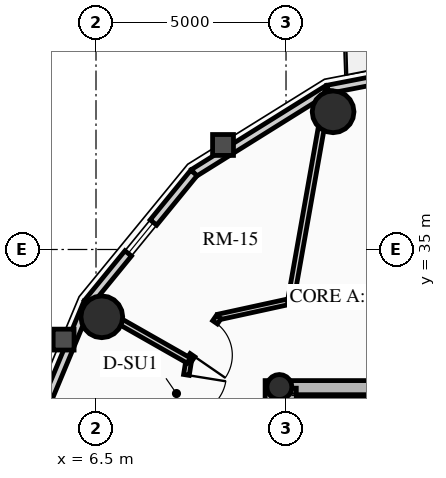
"""IFC4 building model, lengths in metres.
Left out: names, types, materials, properties, quantities, classifications, styles, units other than length and angle.
Written with IfcOpenShell. Run it as: python <this file> out.ifc"""

import sys

from ifc_helpers import new_model, si_unit, direction, frame, frame_2d, origin, origin_2d, place, context, subcontext, project, spatial, rectangle, circle, hollow_circle, extrude, source, transform, mapped, element, fill, save


model = new_model("IFC4")
c1 = context("Model", 3, precision=1e-05, world=origin(), true_north=direction((0.0, 1.0)))
c2 = subcontext(c1, "Body", "Model", "MODEL_VIEW")
j1 = project(units=[si_unit("LENGTHUNIT", "METRE"), si_unit("PLANEANGLEUNIT", "RADIAN")], contexts=[c1])
p1 = place(None, origin())
s1 = spatial("IfcSite", under=j1, at=p1, CompositionType="ELEMENT")
p2 = place(p1, origin())
s2 = spatial("IfcBuilding", under=s1, at=p2, CompositionType="ELEMENT")
p3 = place(p2, frame((0.0, 0.0, 205.39)))
s3 = spatial("IfcBuildingStorey", under=s2, at=p3, CompositionType="ELEMENT", Elevation=205.39)
p4 = place(p3, frame((11.15, 17.45, 0.0), z_axis=(0.0, 0.0, 1.0), x_axis=(0.0, 1.0, 0.0)))
e1 = element("IfcWall", 1, at=p4, inside=s3, PredefinedType="SHEAR", context=c2, shape_type="SweptSolid", body=[
    extrude(rectangle(XDim=14.1, YDim=0.4, at=frame_2d((7.05, 0.0))), origin(), (0.0, 0.0, 1.0), 2.91),
])
p5 = place(p3, frame((11.15, 31.35, 0.0), z_axis=(0.0, 0.0, 1.0), x_axis=(1.0, 0.0, 0.0)))
e2 = element("IfcWall", 2, at=p5, inside=s3, PredefinedType="SHEAR", context=c2, shape_type="SweptSolid", body=[
    extrude(rectangle(XDim=10.7, YDim=0.4, at=frame_2d((5.35, 0.0))), origin(), (0.0, 0.0, 1.0), 2.91),
])
m1 = source(origin(), c2, "Body", "SweptSolid", [
    extrude(rectangle(XDim=1.5, YDim=2.02, at=frame_2d((0.75, 1.01))), frame((0.0, 0.21, 0.0), z_axis=(0.0, -1.0, 0.0), x_axis=(1.0, 0.0, 0.0)), (0.0, 0.0, 1.0), 0.42),
])
p6 = place(p5, frame((4.6, 0.0, 0.0)))
e3 = element("IfcOpeningElement", 3, at=p6, cuts=e2, PredefinedType="OPENING", context=c2, shape_type="MappedRepresentation", body=[
    mapped(m1, transform((0.0, 0.0, 0.0), x_axis=(1.0, 0.0, 0.0), y_axis=(0.0, 1.0, 0.0), z_axis=(0.0, 0.0, 1.0), scale=1.0)),
])
p7 = place(p3, frame((11.595, 24.655, 0.0), z_axis=(0.0, 0.0, 1.0), x_axis=(0.0, 1.0, 0.0)))
e4 = element("IfcWall", 4, at=p7, inside=s3, PredefinedType="SHEAR", context=c2, shape_type="SweptSolid", body=[
    extrude(rectangle(XDim=6.695, YDim=0.35, at=frame_2d((3.348, 0.0))), origin(), (0.0, 0.0, 1.0), 2.91),
])
p8 = place(p3, frame((11.325, 31.38, 0.0), z_axis=(0.0, 0.0, 1.0), x_axis=(1.0, 0.0, 0.0)))
e5 = element("IfcColumn", 5, at=p8, inside=s3, PredefinedType="COLUMN", context=c2, shape_type="SweptSolid", body=[
    extrude(hollow_circle(Radius=0.33, WallThickness=0.025, at=origin_2d()), origin(), (0.0, 0.0, 1.0), 2.91),
])
for number, where, z_axis, x_axis in (
    (6, (12.739, 38.623, 0.0), (0.0, 0.0, 1.0), (1.0, 0.0, 0.0)),
    (7, (6.653, 33.229, 0.0), (0.0, 0.0, 1.0), (1.0, 0.0, 0.0)),
):
    element("IfcColumn", number, at=place(p3, frame(where, z_axis=z_axis, x_axis=x_axis)), inside=s3, PredefinedType="USERDEFINED", context=c2, shape_type="SweptSolid", body=[
        extrude(circle(Radius=0.55, at=origin_2d()), origin(), (0.0, 0.0, 1.0), 2.91),
    ])
p9 = place(p3, frame((12.597, 39.213, 0.0), z_axis=(0.0, 0.0, 1.0), x_axis=(0.981700307484, 0.190432419211, 0.0)))
e8 = element("IfcWall", 8, at=p9, inside=s3, PredefinedType="SOLIDWALL", context=c2, shape_type="SweptSolid", body=[
    extrude(rectangle(XDim=3.976, YDim=0.22, at=frame_2d((1.988, 0.0))), origin(), (0.0, 0.0, 1.0), 2.322),
])
m2 = source(origin(), c2, "Body", "SweptSolid", [
    extrude(rectangle(XDim=1.15, YDim=2.005, at=frame_2d((0.575, 1.002))), frame((0.0, 0.12, 0.0), z_axis=(0.0, -1.0, 0.0), x_axis=(1.0, 0.0, 0.0)), (0.0, 0.0, 1.0), 0.24),
])
p10 = place(p9, frame((1.413, 0.0, 0.0)))
e9 = element("IfcOpeningElement", 9, at=p10, cuts=e8, PredefinedType="OPENING", context=c2, shape_type="MappedRepresentation", body=[
    mapped(m2, transform((0.0, 0.0, 0.0), x_axis=(1.0, 0.0, 0.0), y_axis=(0.0, 1.0, 0.0), z_axis=(0.0, 0.0, 1.0), scale=1.0)),
])
p11 = place(p3, frame((9.076, 37.015, 0.0), z_axis=(0.0, 0.0, 1.0), x_axis=(0.848318713376, 0.529485939886, 0.0)))
e10 = element("IfcWall", 10, at=p11, inside=s3, PredefinedType="SOLIDWALL", context=c2, shape_type="SweptSolid", body=[
    extrude(rectangle(XDim=4.15, YDim=0.22, at=frame_2d((2.075, 0.0))), origin(), (0.0, 0.0, 1.0), 2.322),
])
p12 = place(p3, frame((6.282, 33.593, 0.0), z_axis=(0.0, 0.0, 1.0), x_axis=(0.632467166636, 0.774587169483, 0.0)))
e11 = element("IfcWall", 11, at=p12, inside=s3, PredefinedType="SOLIDWALL", context=c2, shape_type="SweptSolid", body=[
    extrude(rectangle(XDim=4.418, YDim=0.22, at=frame_2d((2.209, 0.0))), origin(), (0.0, 0.0, 1.0), 2.322),
])
m3 = source(origin(), c2, "Body", "SweptSolid", [
    extrude(rectangle(XDim=1.05, YDim=1.3, at=frame_2d((0.525, 0.65))), frame((0.0, 0.12, 0.0), z_axis=(0.0, -1.0, 0.0), x_axis=(1.0, 0.0, 0.0)), (0.0, 0.0, 1.0), 0.24),
])
p13 = place(p12, frame((1.684, 0.0, 0.65)))
e12 = element("IfcOpeningElement", 12, at=p13, cuts=e11, PredefinedType="OPENING", context=c2, shape_type="MappedRepresentation", body=[
    mapped(m3, transform((0.0, 0.0, 0.0), x_axis=(1.0, 0.0, 0.0), y_axis=(0.0, 1.0, 0.0), z_axis=(0.0, 0.0, 1.0), scale=1.0)),
])
p14 = place(p3, frame((4.488, 29.281, 0.0), z_axis=(0.0, 0.0, 1.0), x_axis=(0.384036305194, 0.923317993052, 0.0)))
e13 = element("IfcWall", 13, at=p14, inside=s3, PredefinedType="SOLIDWALL", context=c2, shape_type="SweptSolid", body=[
    extrude(rectangle(XDim=4.671, YDim=0.22, at=frame_2d((2.335, 0.0))), origin(), (0.0, 0.0, 1.0), 2.322),
])
p15 = place(p3, frame((18.143, 33.86, 0.0), z_axis=(0.0, 0.0, 1.0), x_axis=(-0.999419208319, -0.034077060363, 0.0)))
e14 = element("IfcWall", 14, at=p15, inside=s3, PredefinedType="PARTITIONING", context=c2, shape_type="SweptSolid", body=[
    extrude(rectangle(XDim=6.527, YDim=0.15, at=frame_2d((3.263, 0.0))), origin(), (0.0, 0.0, 1.0), 2.255),
])
p16 = place(p3, frame((11.62, 33.637, 0.0), z_axis=(0.0, 0.0, 1.0), x_axis=(-0.97702579435, -0.213121085711, 0.0)))
e15 = element("IfcWall", 15, at=p16, inside=s3, PredefinedType="PARTITIONING", context=c2, shape_type="SweptSolid", body=[
    extrude(rectangle(XDim=1.935, YDim=0.15, at=frame_2d((0.967, 0.0))), origin(), (0.0, 0.0, 1.0), 2.255),
])
p17 = place(p3, frame((9.729, 33.225, 0.0), z_axis=(0.0, 0.0, 1.0), x_axis=(-0.567183649484, -0.82359134755, 0.0)))
e16 = element("IfcWall", 16, at=p17, inside=s3, PredefinedType="PARTITIONING", context=c2, shape_type="SweptSolid", body=[
    extrude(rectangle(XDim=1.392, YDim=0.15, at=frame_2d((0.696, 0.0))), origin(), (0.0, 0.0, 1.0), 2.322),
])
m4 = source(origin(), c2, "Body", "SweptSolid", [
    extrude(rectangle(XDim=1.05, YDim=2.015, at=frame_2d((0.525, 1.007))), frame((0.0, 0.085, 0.0), z_axis=(0.0, -1.0, 0.0), x_axis=(1.0, 0.0, 0.0)), (0.0, 0.0, 1.0), 0.17),
])
p18 = place(p17, frame((0.171, 0.0, 0.0)))
e17 = element("IfcOpeningElement", 17, at=p18, cuts=e16, PredefinedType="OPENING", context=c2, shape_type="MappedRepresentation", body=[
    mapped(m4, transform((0.0, 0.0, 0.0), x_axis=(1.0, 0.0, 0.0), y_axis=(0.0, 1.0, 0.0), z_axis=(0.0, 0.0, 1.0), scale=1.0)),
])
p19 = place(p3, frame((8.94, 32.078, 0.0), z_axis=(0.0, 0.0, 1.0), x_axis=(-0.159148467753, -0.98725466077, 0.0)))
e18 = element("IfcWall", 18, at=p19, inside=s3, PredefinedType="PARTITIONING", context=c2, shape_type="SweptSolid", body=[
    extrude(rectangle(XDim=1.554, YDim=0.15, at=frame_2d((0.777, 0.0))), origin(), (0.0, 0.0, 1.0), 2.255),
])
p20 = place(p19, frame((0.384, 0.0, 0.0)))
e19 = element("IfcOpeningElement", 19, at=p20, cuts=e18, PredefinedType="OPENING", context=c2, shape_type="MappedRepresentation", body=[
    mapped(m4, transform((0.0, 0.0, 0.0), x_axis=(1.0, 0.0, 0.0), y_axis=(0.0, 1.0, 0.0), z_axis=(0.0, 0.0, 1.0), scale=1.0)),
])
p21 = place(p3, frame((11.62, 33.637, 0.0), z_axis=(0.0, 0.0, 1.0), x_axis=(0.174269061361, 0.984698072636, 0.0)))
e20 = element("IfcWall", 20, at=p21, inside=s3, PredefinedType="PARTITIONING", context=c2, shape_type="SweptSolid", body=[
    extrude(rectangle(XDim=5.643, YDim=0.16, at=frame_2d((2.822, 0.0))), origin(), (0.0, 0.0, 1.0), 2.322),
])
p22 = place(p3, frame((8.94, 32.078, 0.0), z_axis=(0.0, 0.0, 1.0), x_axis=(-0.869170975588, 0.494511693689, 0.0)))
e21 = element("IfcWall", 21, at=p22, inside=s3, PredefinedType="PARTITIONING", context=c2, shape_type="SweptSolid", body=[
    extrude(rectangle(XDim=3.039, YDim=0.16, at=frame_2d((1.52, 0.0))), origin(), (0.0, 0.0, 1.0), 2.322),
])
m5 = source(origin(), c2, "Body", "SweptSolid", [
    extrude(rectangle(XDim=1.05, YDim=1.3, at=frame_2d((0.525, 0.65))), frame((0.0, 0.03, 0.0), z_axis=(0.0, -1.0, 0.0), x_axis=(1.0, 0.0, 0.0)), (0.0, 0.0, 1.0), 0.06),
])
p23 = place(p13, origin())
e22 = element("IfcWindow", 22, at=p23, inside=s3, PartitioningType="SINGLE_PANEL", PredefinedType="WINDOW", context=c2, shape_type="MappedRepresentation", body=[
    mapped(m5, transform((0.0, 0.0, 0.0), x_axis=(1.0, 0.0, 0.0), y_axis=(0.0, 1.0, 0.0), z_axis=(0.0, 0.0, 1.0), scale=1.0)),
])
fill(e12, e22)
m6 = source(origin(), c2, "Body", "SweptSolid", [
    extrude(rectangle(XDim=1.05, YDim=2.015, at=frame_2d((0.525, 1.007))), frame((0.0, 0.025, 0.0), z_axis=(0.0, -1.0, 0.0), x_axis=(1.0, 0.0, 0.0)), (0.0, 0.0, 1.0), 0.05),
])
p24 = place(p18, origin())
e23 = element("IfcDoor", 23, at=p24, inside=s3, OperationType="SINGLE_SWING_RIGHT", PredefinedType="DOOR", context=c2, shape_type="MappedRepresentation", body=[
    mapped(m6, transform((0.0, 0.0, 0.0), x_axis=(1.0, 0.0, 0.0), y_axis=(0.0, 1.0, 0.0), z_axis=(0.0, 0.0, 1.0), scale=1.0)),
])
fill(e17, e23)
p25 = place(p20, origin())
e24 = element("IfcDoor", 24, at=p25, inside=s3, OperationType="SINGLE_SWING_LEFT", PredefinedType="DOOR", context=c2, shape_type="MappedRepresentation", body=[
    mapped(m6, transform((0.0, 0.0, 0.0), x_axis=(1.0, 0.0, 0.0), y_axis=(0.0, 1.0, 0.0), z_axis=(0.0, 0.0, 1.0), scale=1.0)),
])
fill(e19, e24)
save(model, sys.argv[1])
